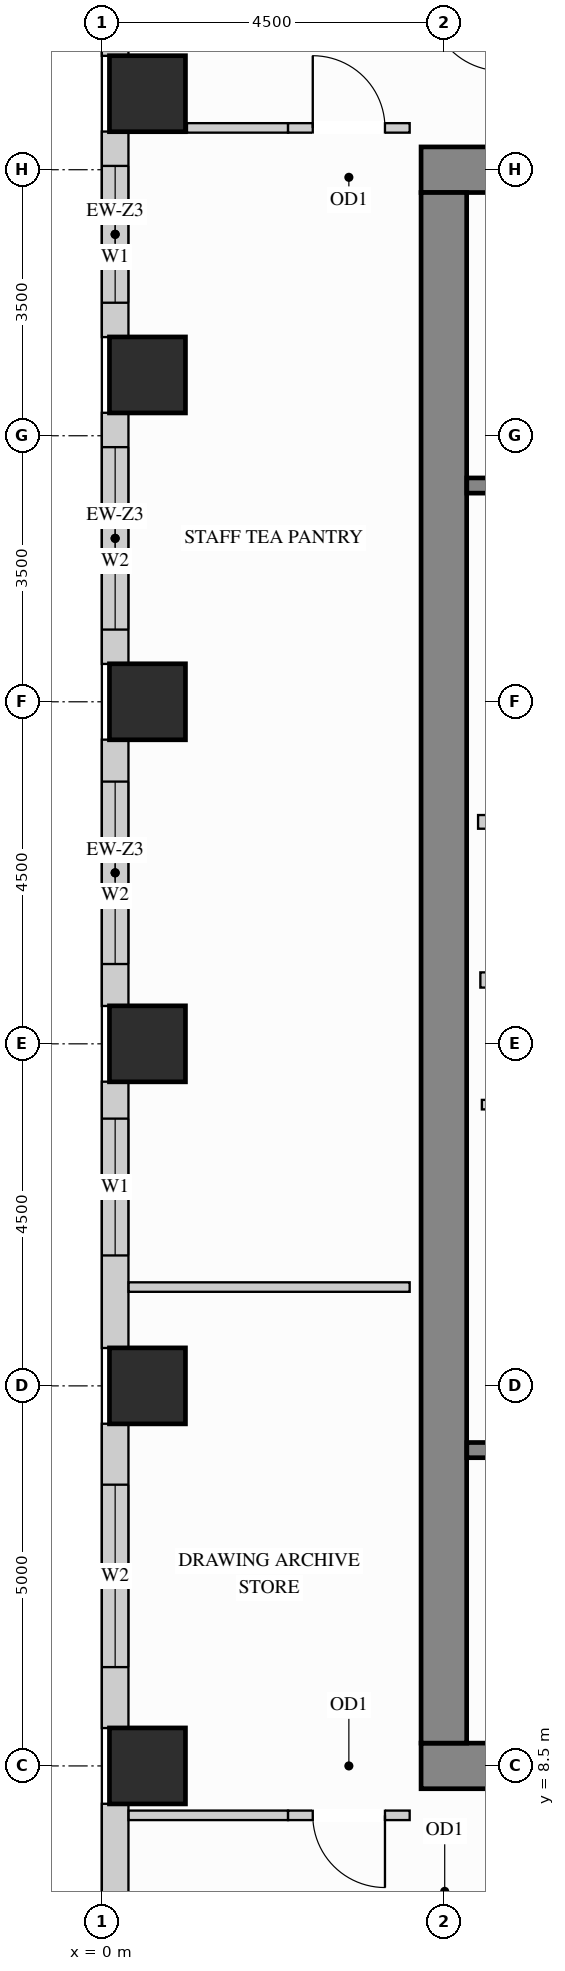
"""IFC4 building model, lengths in metres.
Left out: names, types, materials, properties, quantities, classifications, styles, units other than length and angle.
Written with IfcOpenShell. Run it as: python <this file> out.ifc"""

import sys

from ifc_helpers import new_model, si_unit, direction, frame, frame_2d, origin, origin_2d, place, context, subcontext, project, spatial, rectangle, extrude, source, transform, mapped, element, fill, save


model = new_model("IFC4")
c1 = context("Model", 3, precision=1e-05, world=origin(), true_north=direction((0.0, 1.0)))
c2 = subcontext(c1, "Body", "Model", "MODEL_VIEW")
j1 = project(units=[si_unit("LENGTHUNIT", "METRE"), si_unit("PLANEANGLEUNIT", "RADIAN")], contexts=[c1])
p1 = place(None, origin())
s1 = spatial("IfcSite", under=j1, at=p1, CompositionType="ELEMENT")
p2 = place(p1, origin())
s2 = spatial("IfcBuilding", under=s1, at=p2, CompositionType="ELEMENT")
p3 = place(p2, frame((0.0, 0.0, 150.3)))
s3 = spatial("IfcBuildingStorey", under=s2, at=p3, CompositionType="ELEMENT", Elevation=150.3)
m1 = source(origin(), c2, "Body", "SweptSolid", [
    extrude(rectangle(XDim=1.0, YDim=1.0, at=origin_2d()), origin(), (0.0, 0.0, 1.0), 3.4),
])
for number, where, z_axis, x_axis in (
    (1, (0.6, 13.5, 0.0), (0.0, 0.0, 1.0), (1.0, 0.0, 0.0)),
    (2, (0.6, 18.0, 0.0), (0.0, 0.0, 1.0), (1.0, 0.0, 0.0)),
    (3, (0.6, 22.5, 0.0), (0.0, 0.0, 1.0), (1.0, 0.0, 0.0)),
    (4, (0.6, 26.8, 0.0), (0.0, 0.0, 1.0), (1.0, 0.0, 0.0)),
    (5, (0.6, 30.5, 0.0), (0.0, 0.0, 1.0), (1.0, 0.0, 0.0)),
    (6, (0.6, 8.5, 0.0), (0.0, 0.0, 1.0), (1.0, 0.0, 0.0)),
):
    element("IfcColumn", number, at=place(p3, frame(where, z_axis=z_axis, x_axis=x_axis)), inside=s3, PredefinedType="COLUMN", context=c2, shape_type="MappedRepresentation", body=[
        mapped(m1, transform((0.0, 0.0, 0.0), x_axis=(1.0, 0.0, 0.0), y_axis=(0.0, 1.0, 0.0), z_axis=(0.0, 0.0, 1.0))),
    ])
m2 = source(origin(), c2, "Body", "SweptSolid", [
    extrude(rectangle(XDim=10.6, YDim=0.6, at=frame_2d((5.3, 0.0))), origin(), (0.0, 0.0, 1.0), 3.4),
])
for number, where, z_axis, x_axis in (
    (7, (4.2, 29.5, 0.0), (0.0, 0.0, 1.0), (1.0, 0.0, 0.0)),
    (8, (4.2, 8.5, 0.0), (0.0, 0.0, 1.0), (1.0, 0.0, 0.0)),
):
    element("IfcWall", number, at=place(p3, frame(where, z_axis=z_axis, x_axis=x_axis)), inside=s3, PredefinedType="SHEAR", context=c2, shape_type="MappedRepresentation", body=[
        mapped(m2, transform((0.0, 0.0, 0.0), x_axis=(1.0, 0.0, 0.0), y_axis=(0.0, 1.0, 0.0), z_axis=(0.0, 0.0, 1.0))),
    ])
m3 = source(origin(), c2, "Body", "SweptSolid", [
    extrude(rectangle(XDim=20.4, YDim=0.6, at=frame_2d((10.2, 0.0))), origin(), (0.0, 0.0, 1.0), 3.4),
])
p4 = place(p3, frame((4.5, 8.8, 0.0), z_axis=(0.0, 0.0, 1.0), x_axis=(0.0, 1.0, 0.0)))
e9 = element("IfcWall", 9, at=p4, inside=s3, PredefinedType="SHEAR", context=c2, shape_type="MappedRepresentation", body=[
    mapped(m3, transform((0.0, 0.0, 0.0), x_axis=(1.0, 0.0, 0.0), y_axis=(0.0, 1.0, 0.0), z_axis=(0.0, 0.0, 1.0))),
])
p5 = place(p3, frame((0.175, 34.502, 0.0), z_axis=(0.0, 0.0, 1.0), x_axis=(0.0, -1.0, 0.0)))
e10 = element("IfcWall", 10, at=p5, inside=s3, PredefinedType="SOLIDWALL", context=c2, shape_type="SweptSolid", body=[
    extrude(rectangle(XDim=3.504, YDim=0.35, at=frame_2d((1.752, 0.0))), origin(), (0.0, 0.0, 1.0), 2.612),
])
p6 = place(p5, frame((0.511, 0.0, 0.78)))
e11 = element("IfcOpeningElement", 11, at=p6, cuts=e10, PredefinedType="OPENING", context=c2, shape_type="SweptSolid", body=[
    extrude(rectangle(XDim=1.8, YDim=1.652, at=frame_2d((0.9, 0.826))), frame((0.0, 0.185, 0.0), z_axis=(0.0, -1.0, 0.0), x_axis=(1.0, 0.0, 0.0)), (0.0, 0.0, 1.0), 0.37),
])
p7 = place(p3, frame((0.175, 30.002, 0.0), z_axis=(0.0, 0.0, 1.0), x_axis=(0.0, -1.0, 0.0)))
e12 = element("IfcWall", 12, at=p7, inside=s3, PredefinedType="SOLIDWALL", context=c2, shape_type="SweptSolid", body=[
    extrude(rectangle(XDim=2.704, YDim=0.35, at=frame_2d((1.352, 0.0))), origin(), (0.0, 0.0, 1.0), 2.612),
])
p8 = place(p7, frame((0.452, 0.0, 0.78)))
e13 = element("IfcOpeningElement", 13, at=p8, cuts=e12, PredefinedType="OPENING", context=c2, shape_type="SweptSolid", body=[
    extrude(rectangle(XDim=1.8, YDim=1.652, at=frame_2d((0.9, 0.826))), frame((0.0, 0.185, 0.0), z_axis=(0.0, -1.0, 0.0), x_axis=(1.0, 0.0, 0.0)), (0.0, 0.0, 1.0), 0.37),
])
p9 = place(p3, frame((0.175, 26.302, 0.0), z_axis=(0.0, 0.0, 1.0), x_axis=(0.0, -1.0, 0.0)))
e14 = element("IfcWall", 14, at=p9, inside=s3, PredefinedType="SOLIDWALL", context=c2, shape_type="SweptSolid", body=[
    extrude(rectangle(XDim=3.304, YDim=0.35, at=frame_2d((1.652, 0.0))), origin(), (0.0, 0.0, 1.0), 2.612),
])
p10 = place(p9, frame((0.452, 0.0, 0.78)))
e15 = element("IfcOpeningElement", 15, at=p10, cuts=e14, PredefinedType="OPENING", context=c2, shape_type="SweptSolid", body=[
    extrude(rectangle(XDim=2.4, YDim=1.652, at=frame_2d((1.2, 0.826))), frame((0.0, 0.185, 0.0), z_axis=(0.0, -1.0, 0.0), x_axis=(1.0, 0.0, 0.0)), (0.0, 0.0, 1.0), 0.37),
])
p11 = place(p3, frame((0.175, 22.002, 0.0), z_axis=(0.0, 0.0, 1.0), x_axis=(0.0, -1.0, 0.0)))
e16 = element("IfcWall", 16, at=p11, inside=s3, PredefinedType="SOLIDWALL", context=c2, shape_type="SweptSolid", body=[
    extrude(rectangle(XDim=3.504, YDim=0.35, at=frame_2d((1.752, 0.0))), origin(), (0.0, 0.0, 1.0), 2.612),
])
p12 = place(p11, frame((0.552, 0.0, 0.78)))
e17 = element("IfcOpeningElement", 17, at=p12, cuts=e16, PredefinedType="OPENING", context=c2, shape_type="SweptSolid", body=[
    extrude(rectangle(XDim=2.4, YDim=1.652, at=frame_2d((1.2, 0.826))), frame((0.0, 0.185, 0.0), z_axis=(0.0, -1.0, 0.0), x_axis=(1.0, 0.0, 0.0)), (0.0, 0.0, 1.0), 0.37),
])
p13 = place(p3, frame((0.175, 17.502, 0.0), z_axis=(0.0, 0.0, 1.0), x_axis=(0.0, -1.0, 0.0)))
e18 = element("IfcWall", 18, at=p13, inside=s3, PredefinedType="SOLIDWALL", context=c2, shape_type="SweptSolid", body=[
    extrude(rectangle(XDim=3.504, YDim=0.35, at=frame_2d((1.752, 0.0))), origin(), (0.0, 0.0, 1.0), 2.612),
])
p14 = place(p13, frame((0.486, 0.0, 0.78)))
e19 = element("IfcOpeningElement", 19, at=p14, cuts=e18, PredefinedType="OPENING", context=c2, shape_type="SweptSolid", body=[
    extrude(rectangle(XDim=1.8, YDim=1.652, at=frame_2d((0.9, 0.826))), frame((0.0, 0.185, 0.0), z_axis=(0.0, -1.0, 0.0), x_axis=(1.0, 0.0, 0.0)), (0.0, 0.0, 1.0), 0.37),
])
p15 = place(p3, frame((0.175, 13.002, 0.0), z_axis=(0.0, 0.0, 1.0), x_axis=(0.0, -1.0, 0.0)))
e20 = element("IfcWall", 20, at=p15, inside=s3, PredefinedType="SOLIDWALL", context=c2, shape_type="SweptSolid", body=[
    extrude(rectangle(XDim=4.004, YDim=0.35, at=frame_2d((2.002, 0.0))), origin(), (0.0, 0.0, 1.0), 2.612),
])
p16 = place(p15, frame((0.802, 0.0, 0.78)))
e21 = element("IfcOpeningElement", 21, at=p16, cuts=e20, PredefinedType="OPENING", context=c2, shape_type="SweptSolid", body=[
    extrude(rectangle(XDim=2.4, YDim=1.652, at=frame_2d((1.2, 0.826))), frame((0.0, 0.185, 0.0), z_axis=(0.0, -1.0, 0.0), x_axis=(1.0, 0.0, 0.0)), (0.0, 0.0, 1.0), 0.37),
])
p17 = place(p3, frame((0.175, 8.002, 0.0), z_axis=(0.0, 0.0, 1.0), x_axis=(0.0, -1.0, 0.0)))
e22 = element("IfcWall", 22, at=p17, inside=s3, PredefinedType="SOLIDWALL", context=c2, shape_type="SweptSolid", body=[
    extrude(rectangle(XDim=4.004, YDim=0.35, at=frame_2d((2.002, 0.0))), origin(), (0.0, 0.0, 1.0), 2.612),
])
p18 = place(p17, frame((2.268, 0.0, 0.78)))
e23 = element("IfcOpeningElement", 23, at=p18, cuts=e22, PredefinedType="OPENING", context=c2, shape_type="SweptSolid", body=[
    extrude(rectangle(XDim=1.2, YDim=1.652, at=frame_2d((0.6, 0.826))), frame((0.0, 0.185, 0.0), z_axis=(0.0, -1.0, 0.0), x_axis=(1.0, 0.0, 0.0)), (0.0, 0.0, 1.0), 0.37),
])
m4 = source(origin(), c2, "Body", "SweptSolid", [
    extrude(rectangle(XDim=2.2, YDim=0.18, at=frame_2d((1.1, 0.0))), origin(), (0.0, 0.0, 1.0), 3.385),
])
p19 = place(p3, frame((4.95, 20.92, 0.0), z_axis=(0.0, 0.0, 1.0), x_axis=(1.0, 0.0, 0.0)))
e24 = element("IfcWall", 24, at=p19, inside=s3, PredefinedType="PARTITIONING", context=c2, shape_type="MappedRepresentation", body=[
    mapped(m4, transform((0.0, 0.0, 0.0), x_axis=(1.0, 0.0, 0.0), y_axis=(0.0, 1.0, 0.0), z_axis=(0.0, 0.0, 1.0))),
])
p20 = place(p3, frame((5.0, 17.2, 0.0), z_axis=(0.0, 0.0, 1.0), x_axis=(1.0, 0.0, 0.0)))
e25 = element("IfcWall", 25, at=p20, inside=s3, PredefinedType="PARTITIONING", context=c2, shape_type="SweptSolid", body=[
    extrude(rectangle(XDim=2.4, YDim=0.125, at=frame_2d((1.2, 0.0))), origin(), (0.0, 0.0, 1.0), 3.385),
])
p21 = place(p20, frame((0.7, 0.0, 0.0)))
e26 = element("IfcOpeningElement", 26, at=p21, cuts=e25, PredefinedType="OPENING", context=c2, shape_type="SweptSolid", body=[
    extrude(rectangle(XDim=0.85, YDim=2.1, at=frame_2d((0.425, 1.05))), frame((0.0, 0.073, 0.0), z_axis=(0.0, -1.0, 0.0), x_axis=(1.0, 0.0, 0.0)), (0.0, 0.0, 1.0), 0.145),
])
m5 = source(origin(), c2, "Body", "SweptSolid", [
    extrude(rectangle(XDim=1.33, YDim=0.125, at=frame_2d((0.665, 0.0))), origin(), (0.0, 0.0, 1.0), 3.385),
])
p22 = place(p3, frame((1.12, 30.05, 0.0), z_axis=(0.0, 0.0, 1.0), x_axis=(1.0, 0.0, 0.0)))
e27 = element("IfcWall", 27, at=p22, inside=s3, PredefinedType="PARTITIONING", context=c2, shape_type="MappedRepresentation", body=[
    mapped(m5, transform((0.0, 0.0, 0.0), x_axis=(1.0, 0.0, 0.0), y_axis=(0.0, 1.0, 0.0), z_axis=(0.0, 0.0, 1.0))),
])
p23 = place(p3, frame((2.45, 30.05, 0.0), z_axis=(0.0, 0.0, 1.0), x_axis=(1.0, 0.0, 0.0)))
e28 = element("IfcWall", 28, at=p23, inside=s3, PredefinedType="PARTITIONING", context=c2, shape_type="SweptSolid", body=[
    extrude(rectangle(XDim=1.6, YDim=0.125, at=frame_2d((0.8, 0.0))), origin(), (0.0, 0.0, 1.0), 3.385),
])
p24 = place(p23, frame((0.325, 0.0, 0.0)))
e29 = element("IfcOpeningElement", 29, at=p24, cuts=e28, PredefinedType="OPENING", context=c2, shape_type="SweptSolid", body=[
    extrude(rectangle(XDim=0.95, YDim=2.15, at=frame_2d((0.475, 1.075))), frame((0.0, 0.073, 0.0), z_axis=(0.0, -1.0, 0.0), x_axis=(1.0, 0.0, 0.0)), (0.0, 0.0, 1.0), 0.145),
])
m6 = source(origin(), c2, "Body", "SweptSolid", [
    extrude(rectangle(XDim=2.098, YDim=0.125, at=frame_2d((1.049, 0.0))), origin(), (0.0, 0.0, 1.0), 3.385),
])
p25 = place(p3, frame((0.352, 7.85, 0.0), z_axis=(0.0, 0.0, 1.0), x_axis=(1.0, 0.0, 0.0)))
e30 = element("IfcWall", 30, at=p25, inside=s3, PredefinedType="PARTITIONING", context=c2, shape_type="MappedRepresentation", body=[
    mapped(m6, transform((0.0, 0.0, 0.0), x_axis=(1.0, 0.0, 0.0), y_axis=(0.0, 1.0, 0.0), z_axis=(0.0, 0.0, 1.0))),
])
p26 = place(p3, frame((2.45, 7.85, 0.0), z_axis=(0.0, 0.0, 1.0), x_axis=(1.0, 0.0, 0.0)))
e31 = element("IfcWall", 31, at=p26, inside=s3, PredefinedType="PARTITIONING", context=c2, shape_type="SweptSolid", body=[
    extrude(rectangle(XDim=1.6, YDim=0.125, at=frame_2d((0.8, 0.0))), origin(), (0.0, 0.0, 1.0), 3.385),
])
p27 = place(p26, frame((0.325, 0.0, 0.0)))
e32 = element("IfcOpeningElement", 32, at=p27, cuts=e31, PredefinedType="OPENING", context=c2, shape_type="SweptSolid", body=[
    extrude(rectangle(XDim=0.95, YDim=2.15, at=frame_2d((0.475, 1.075))), frame((0.0, 0.073, 0.0), z_axis=(0.0, -1.0, 0.0), x_axis=(1.0, 0.0, 0.0)), (0.0, 0.0, 1.0), 0.145),
])
m7 = source(origin(), c2, "Body", "SweptSolid", [
    extrude(rectangle(XDim=3.698, YDim=0.125, at=frame_2d((1.849, 0.0))), origin(), (0.0, 0.0, 1.0), 3.385),
])
p28 = place(p3, frame((0.352, 14.8, 0.0), z_axis=(0.0, 0.0, 1.0), x_axis=(1.0, 0.0, 0.0)))
e33 = element("IfcWall", 33, at=p28, inside=s3, PredefinedType="PARTITIONING", context=c2, shape_type="MappedRepresentation", body=[
    mapped(m7, transform((0.0, 0.0, 0.0), x_axis=(1.0, 0.0, 0.0), y_axis=(0.0, 1.0, 0.0), z_axis=(0.0, 0.0, 1.0))),
])
m8 = source(origin(), c2, "Body", "SweptSolid", [
    extrude(rectangle(XDim=2.09, YDim=0.2, at=frame_2d((1.045, 0.0))), origin(), (0.0, 0.0, 1.0), 3.385),
])
p29 = place(p3, frame((4.98, 18.84, 0.0), z_axis=(0.0, 0.0, 1.0), x_axis=(1.0, 0.0, 0.0)))
e34 = element("IfcWall", 34, at=p29, inside=s3, PredefinedType="PARTITIONING", context=c2, shape_type="MappedRepresentation", body=[
    mapped(m8, transform((0.0, 0.0, 0.0), x_axis=(1.0, 0.0, 0.0), y_axis=(0.0, 1.0, 0.0), z_axis=(0.0, 0.0, 1.0))),
])
p30 = place(p3, frame((4.802, 12.655, 0.0), z_axis=(0.0, 0.0, 1.0), x_axis=(1.0, 0.0, 0.0)))
e35 = element("IfcWall", 35, at=p30, inside=s3, PredefinedType="SHEAR", context=c2, shape_type="SweptSolid", body=[
    extrude(rectangle(XDim=7.603, YDim=0.2, at=frame_2d((3.802, 0.0))), origin(), (0.0, 0.0, 1.0), 3.4),
])
p31 = place(p30, frame((0.4, 0.0, 0.0)))
e36 = element("IfcOpeningElement", 36, at=p31, cuts=e35, PredefinedType="OPENING", context=c2, shape_type="SweptSolid", body=[
    extrude(rectangle(XDim=1.1, YDim=2.15, at=frame_2d((0.55, 1.075))), frame((0.0, 0.11, 0.0), z_axis=(0.0, -1.0, 0.0), x_axis=(1.0, 0.0, 0.0)), (0.0, 0.0, 1.0), 0.22),
])
p32 = place(p3, frame((4.802, 25.345, 0.0), z_axis=(0.0, 0.0, 1.0), x_axis=(1.0, 0.0, 0.0)))
e37 = element("IfcWall", 37, at=p32, inside=s3, PredefinedType="SHEAR", context=c2, shape_type="SweptSolid", body=[
    extrude(rectangle(XDim=7.603, YDim=0.2, at=frame_2d((3.802, 0.0))), origin(), (0.0, 0.0, 1.0), 3.4),
])
p33 = place(p32, frame((0.4, 0.0, 0.0)))
e38 = element("IfcOpeningElement", 38, at=p33, cuts=e37, PredefinedType="OPENING", context=c2, shape_type="SweptSolid", body=[
    extrude(rectangle(XDim=1.1, YDim=2.15, at=frame_2d((0.55, 1.075))), frame((0.0, 0.11, 0.0), z_axis=(0.0, -1.0, 0.0), x_axis=(1.0, 0.0, 0.0)), (0.0, 0.0, 1.0), 0.22),
])
m9 = source(origin(), c2, "Body", "SweptSolid", [
    extrude(rectangle(XDim=0.95, YDim=2.15, at=frame_2d((0.475, 1.075))), frame((0.0, 0.025, 0.0), z_axis=(0.0, -1.0, 0.0), x_axis=(1.0, 0.0, 0.0)), (0.0, 0.0, 1.0), 0.05),
])
p34 = place(p27, origin())
e39 = element("IfcDoor", 39, at=p34, inside=s3, OperationType="SINGLE_SWING_RIGHT", PredefinedType="DOOR", context=c2, shape_type="MappedRepresentation", body=[
    mapped(m9, transform((0.0, 0.0, 0.0), x_axis=(1.0, 0.0, 0.0), y_axis=(0.0, 1.0, 0.0), z_axis=(0.0, 0.0, 1.0))),
])
fill(e32, e39)
p35 = place(p24, origin())
e40 = element("IfcDoor", 40, at=p35, inside=s3, OperationType="SINGLE_SWING_LEFT", PredefinedType="DOOR", context=c2, shape_type="MappedRepresentation", body=[
    mapped(m9, transform((0.0, 0.0, 0.0), x_axis=(1.0, 0.0, 0.0), y_axis=(0.0, 1.0, 0.0), z_axis=(0.0, 0.0, 1.0))),
])
fill(e29, e40)
m10 = source(origin(), c2, "Body", "SweptSolid", [
    extrude(rectangle(XDim=1.8, YDim=1.652, at=frame_2d((0.9, 0.826))), frame((0.0, 0.03, 0.0), z_axis=(0.0, -1.0, 0.0), x_axis=(1.0, 0.0, 0.0)), (0.0, 0.0, 1.0), 0.06),
])
p36 = place(p8, origin())
e41 = element("IfcWindow", 41, at=p36, inside=s3, PartitioningType="SINGLE_PANEL", PredefinedType="WINDOW", context=c2, shape_type="MappedRepresentation", body=[
    mapped(m10, transform((0.0, 0.0, 0.0), x_axis=(1.0, 0.0, 0.0), y_axis=(0.0, 1.0, 0.0), z_axis=(0.0, 0.0, 1.0))),
])
fill(e13, e41)
p37 = place(p14, origin())
e42 = element("IfcWindow", 42, at=p37, inside=s3, PartitioningType="SINGLE_PANEL", PredefinedType="WINDOW", context=c2, shape_type="MappedRepresentation", body=[
    mapped(m10, transform((0.0, 0.0, 0.0), x_axis=(1.0, 0.0, 0.0), y_axis=(0.0, 1.0, 0.0), z_axis=(0.0, 0.0, 1.0))),
])
fill(e19, e42)
m11 = source(origin(), c2, "Body", "SweptSolid", [
    extrude(rectangle(XDim=2.4, YDim=1.652, at=frame_2d((1.2, 0.826))), frame((0.0, 0.03, 0.0), z_axis=(0.0, -1.0, 0.0), x_axis=(1.0, 0.0, 0.0)), (0.0, 0.0, 1.0), 0.06),
])
p38 = place(p10, origin())
e43 = element("IfcWindow", 43, at=p38, inside=s3, PartitioningType="SINGLE_PANEL", PredefinedType="WINDOW", context=c2, shape_type="MappedRepresentation", body=[
    mapped(m11, transform((0.0, 0.0, 0.0), x_axis=(1.0, 0.0, 0.0), y_axis=(0.0, 1.0, 0.0), z_axis=(0.0, 0.0, 1.0))),
])
fill(e15, e43)
p39 = place(p12, origin())
e44 = element("IfcWindow", 44, at=p39, inside=s3, PartitioningType="SINGLE_PANEL", PredefinedType="WINDOW", context=c2, shape_type="MappedRepresentation", body=[
    mapped(m11, transform((0.0, 0.0, 0.0), x_axis=(1.0, 0.0, 0.0), y_axis=(0.0, 1.0, 0.0), z_axis=(0.0, 0.0, 1.0))),
])
fill(e17, e44)
p40 = place(p16, origin())
e45 = element("IfcWindow", 45, at=p40, inside=s3, PartitioningType="SINGLE_PANEL", PredefinedType="WINDOW", context=c2, shape_type="MappedRepresentation", body=[
    mapped(m11, transform((0.0, 0.0, 0.0), x_axis=(1.0, 0.0, 0.0), y_axis=(0.0, 1.0, 0.0), z_axis=(0.0, 0.0, 1.0))),
])
fill(e21, e45)
save(model, sys.argv[1])
